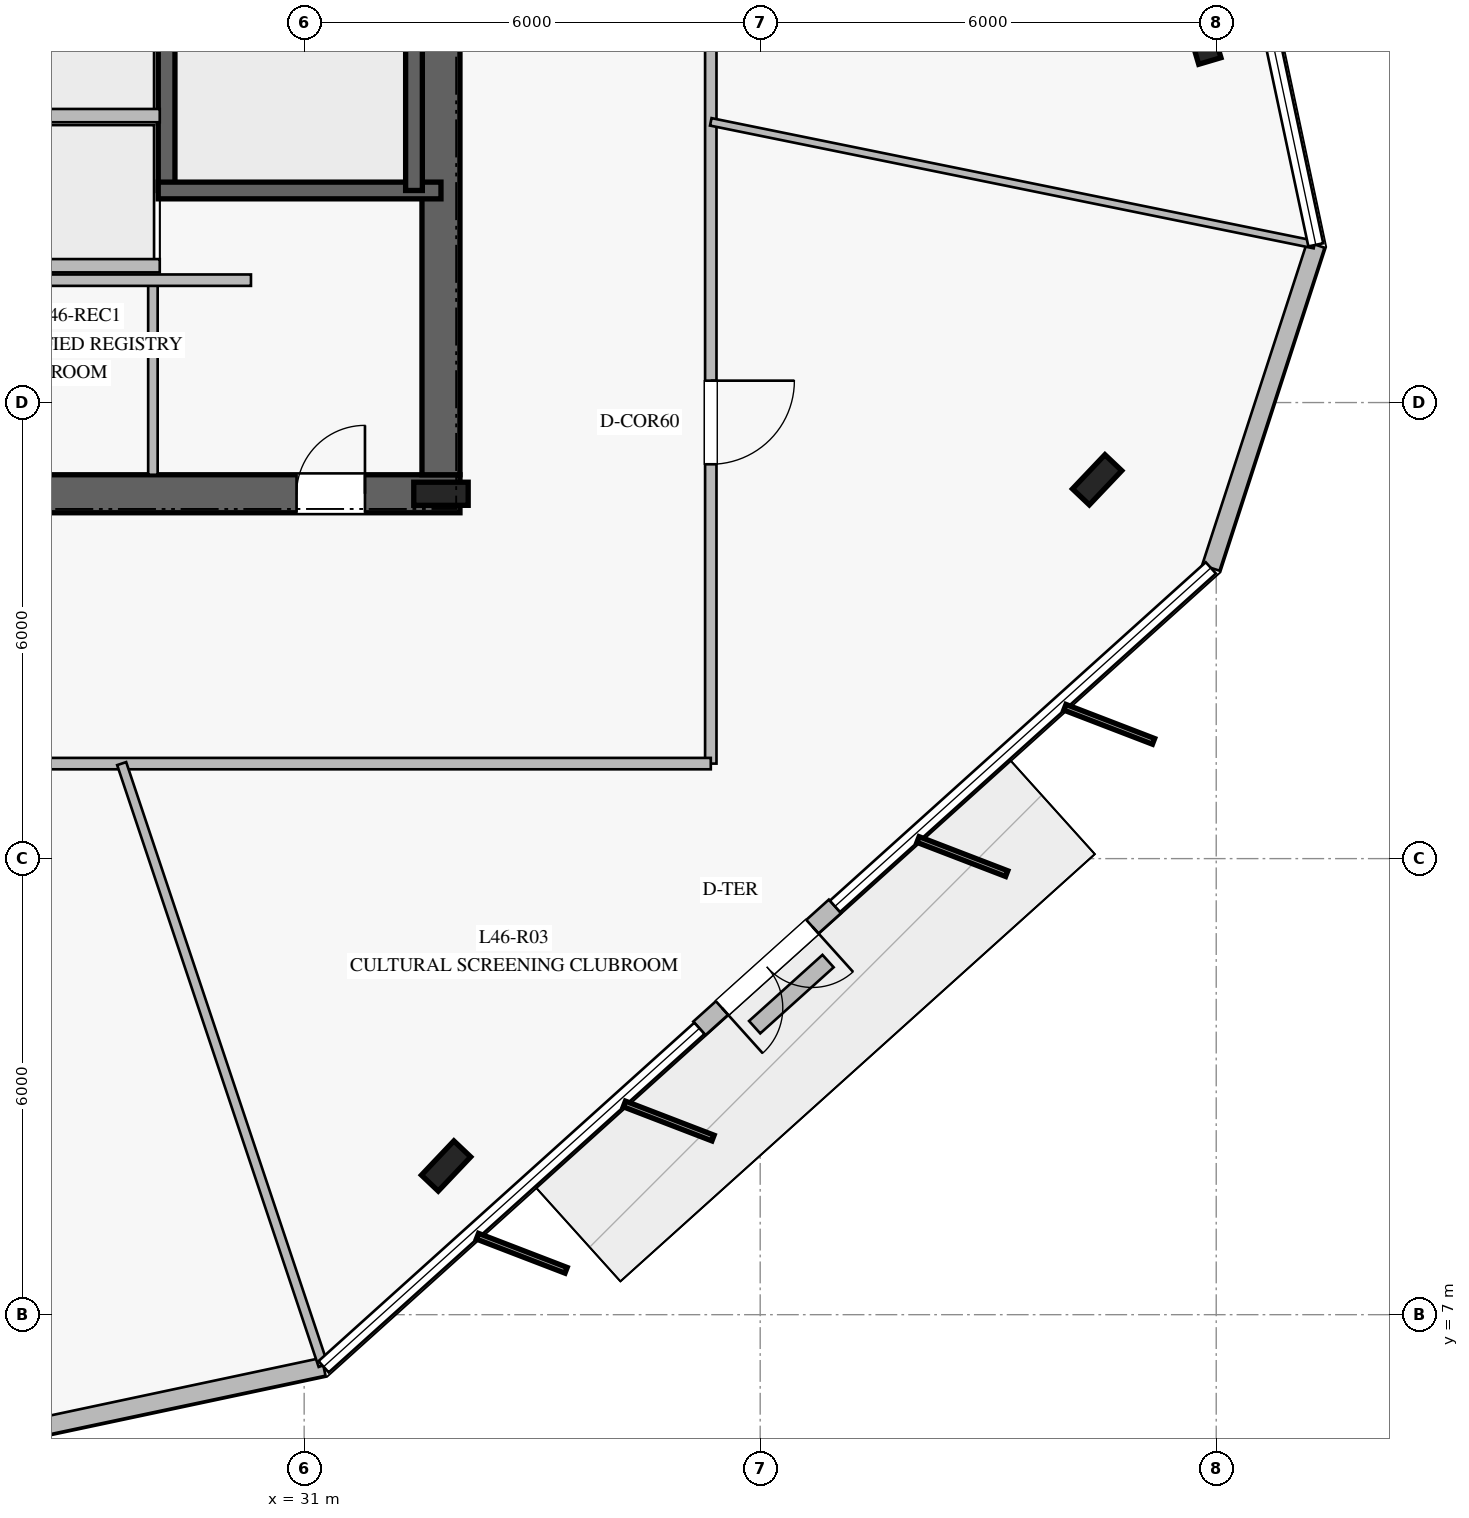
"""IFC4 building model, lengths in metres.
Left out: names, types, materials, properties, quantities, classifications, styles, units other than length and angle.
Written with IfcOpenShell. Run it as: python <this file> out.ifc"""

import sys

from ifc_helpers import new_model, si_unit, direction, frame, frame_2d, origin, origin_2d, place, context, subcontext, project, spatial, rectangle, i_section, extrude, element, fill, save


model = new_model("IFC4")
c1 = context("Model", 3, precision=1e-05, world=origin(), true_north=direction((0.0, 1.0)))
c2 = subcontext(c1, "Body", "Model", "MODEL_VIEW")
j1 = project(units=[si_unit("LENGTHUNIT", "METRE"), si_unit("PLANEANGLEUNIT", "RADIAN")], contexts=[c1])
p1 = place(None, origin())
s1 = spatial("IfcSite", under=j1, at=p1, CompositionType="ELEMENT")
p2 = place(p1, origin())
s2 = spatial("IfcBuilding", under=s1, at=p2, CompositionType="ELEMENT")
p3 = place(p2, frame((0.0, 0.0, 192.8)))
s3 = spatial("IfcBuildingStorey", under=s2, at=p3, CompositionType="ELEMENT", Elevation=192.8)
p4 = place(p3, frame((16.95, 17.8, 0.0), z_axis=(0.0, 0.0, 1.0), x_axis=(1.0, 0.0, 0.0)))
e1 = element("IfcWall", 1, at=p4, inside=s3, PredefinedType="SHEAR", context=c2, shape_type="SweptSolid", body=[
    extrude(rectangle(XDim=16.1, YDim=0.5, at=frame_2d((8.05, 0.0))), origin(), (0.0, 0.0, 1.0), 3.78),
])
p5 = place(p4, frame((5.0, 0.0, 0.0)))
e2 = element("IfcOpeningElement", 2, at=p5, cuts=e1, PredefinedType="OPENING", context=c2, shape_type="SweptSolid", body=[
    extrude(rectangle(XDim=1.2, YDim=2.25, at=frame_2d((0.6, 1.125))), frame((0.0, 0.26, 0.0), z_axis=(0.0, -1.0, 0.0), x_axis=(1.0, 0.0, 0.0)), (0.0, 0.0, 1.0), 0.52),
])
p6 = place(p4, frame((13.95, 0.0, 0.0)))
e3 = element("IfcOpeningElement", 3, at=p6, cuts=e1, PredefinedType="OPENING", context=c2, shape_type="SweptSolid", body=[
    extrude(rectangle(XDim=0.9, YDim=2.1, at=frame_2d((0.45, 1.05))), frame((0.0, 0.26, 0.0), z_axis=(0.0, -1.0, 0.0), x_axis=(1.0, 0.0, 0.0)), (0.0, 0.0, 1.0), 0.52),
])
p7 = place(p4, frame((9.2, 0.0, 0.0)))
e4 = element("IfcOpeningElement", 4, at=p7, cuts=e1, PredefinedType="OPENING", context=c2, shape_type="SweptSolid", body=[
    extrude(rectangle(XDim=1.1, YDim=2.2, at=frame_2d((0.55, 1.1))), frame((0.0, 0.26, 0.0), z_axis=(0.0, -1.0, 0.0), x_axis=(1.0, 0.0, 0.0)), (0.0, 0.0, 1.0), 0.52),
])
p8 = place(p3, frame((32.8, 18.05, 0.0), z_axis=(0.0, 0.0, 1.0), x_axis=(0.0, 1.0, 0.0)))
e5 = element("IfcWall", 5, at=p8, inside=s3, PredefinedType="SHEAR", context=c2, shape_type="SweptSolid", body=[
    extrude(rectangle(XDim=13.9, YDim=0.5, at=frame_2d((6.95, 0.0))), origin(), (0.0, 0.0, 1.0), 3.78),
])
p9 = place(p3, frame((32.8, 17.8, 0.0), z_axis=(0.0, 0.0, 1.0), x_axis=(1.0, 0.0, 0.0)))
e6 = element("IfcColumn", 6, at=p9, inside=s3, PredefinedType="COLUMN", context=c2, shape_type="SweptSolid", body=[
    extrude(i_section(OverallWidth=0.304, OverallDepth=0.716, WebThickness=0.021, FlangeThickness=0.04, at=origin_2d()), origin(), (0.0, 0.0, 1.0), 4.0),
])
p10 = place(p3, frame((29.19, 21.79, 0.0), z_axis=(0.0, 0.0, 1.0), x_axis=(0.0, 1.0, 0.0)))
e7 = element("IfcWall", 7, at=p10, inside=s3, PredefinedType="SOLIDWALL", context=c2, shape_type="SweptSolid", body=[
    extrude(rectangle(XDim=7.22, YDim=0.22, at=frame_2d((3.61, 0.0))), origin(), (0.0, 0.0, 1.0), 3.78),
])
p11 = place(p10, frame((5.88, 0.0, 0.0)))
e8 = element("IfcOpeningElement", 8, at=p11, cuts=e7, PredefinedType="OPENING", context=c2, shape_type="SweptSolid", body=[
    extrude(rectangle(XDim=1.15, YDim=2.2, at=frame_2d((0.575, 1.1))), frame((0.0, 0.12, 0.0), z_axis=(0.0, -1.0, 0.0), x_axis=(1.0, 0.0, 0.0)), (0.0, 0.0, 1.0), 0.24),
])
p12 = place(p3, frame((29.08, 21.79, 0.0), z_axis=(0.0, 0.0, 1.0), x_axis=(1.0, 0.0, 0.0)))
e9 = element("IfcWall", 9, at=p12, inside=s3, PredefinedType="SOLIDWALL", context=c2, shape_type="SweptSolid", body=[
    extrude(rectangle(XDim=3.72, YDim=0.22, at=frame_2d((1.86, 0.0))), origin(), (0.0, 0.0, 1.0), 3.78),
])
p13 = place(p3, frame((32.445, 29.01, 0.0), z_axis=(0.0, 0.0, 1.0), x_axis=(0.0, -1.0, 0.0)))
e10 = element("IfcWall", 10, at=p13, inside=s3, PredefinedType="SOLIDWALL", context=c2, shape_type="SweptSolid", body=[
    extrude(rectangle(XDim=7.22, YDim=0.22, at=frame_2d((3.61, 0.0))), origin(), (0.0, 0.0, 1.0), 3.78),
])
for number, where, z_axis, x_axis in (
    (11, (32.867, 8.956, 0.0), (0.0, 0.0, 1.0), (0.688, 0.725, 0.0)),
    (12, (41.433, 17.984, 0.0), (0.0, 0.0, 1.0), (0.688, 0.725, 0.0)),
    (13, (42.828, 23.791, 0.0), (0.0, 0.0, 1.0), (-0.284, 0.959, 0.0)),
):
    element("IfcColumn", number, at=place(p3, frame(where, z_axis=z_axis, x_axis=x_axis)), inside=s3, PredefinedType="COLUMN", context=c2, shape_type="SweptSolid", body=[
        extrude(i_section(OverallWidth=0.305, OverallDepth=0.62, WebThickness=0.021, FlangeThickness=0.04, at=origin_2d()), origin(), (0.0, 0.0, 1.0), 4.0),
    ])
p14 = place(p3, frame((26.885, 5.386, 0.0), z_axis=(0.0, 0.0, 1.0), x_axis=(0.978154407503, 0.20787966491, 0.0)))
e14 = element("IfcWall", 14, at=p14, inside=s3, PredefinedType="STANDARD", context=c2, shape_type="SweptSolid", body=[
    extrude(rectangle(XDim=4.469, YDim=0.24, at=frame_2d((2.234, 0.0))), origin(), (0.0, 0.0, 1.0), 3.78),
])
p15 = place(p3, frame((36.2, 10.767, 0.0), z_axis=(0.0, 0.0, 1.0), x_axis=(0.743410489012, 0.668835439273, 0.0)))
e15 = element("IfcWall", 15, at=p15, inside=s3, PredefinedType="STANDARD", context=c2, shape_type="SweptSolid", body=[
    extrude(rectangle(XDim=2.4, YDim=0.24, at=frame_2d((1.2, 0.0))), origin(), (0.0, 0.0, 1.0), 3.78),
])
p16 = place(p15, frame((0.4, 0.0, 0.0)))
e16 = element("IfcOpeningElement", 16, at=p16, cuts=e15, PredefinedType="OPENING", context=c2, shape_type="SweptSolid", body=[
    extrude(rectangle(XDim=1.6, YDim=2.25, at=frame_2d((0.8, 1.125))), frame((0.0, 0.13, 0.0), z_axis=(0.0, -1.0, 0.0), x_axis=(1.0, 0.0, 0.0)), (0.0, 0.0, 1.0), 0.26),
])
p17 = place(p3, frame((42.929, 16.825, 0.0), z_axis=(0.0, 0.0, 1.0), x_axis=(0.309056424215, 0.95104370386, 0.0)))
e17 = element("IfcWall", 17, at=p17, inside=s3, PredefinedType="STANDARD", context=c2, shape_type="SweptSolid", body=[
    extrude(rectangle(XDim=4.469, YDim=0.24, at=frame_2d((2.234, 0.0))), origin(), (0.0, 0.0, 1.0), 3.78),
])
p18 = place(p3, frame((36.927, 10.782, 0.0), z_axis=(0.0, 0.0, 1.0), x_axis=(0.743041992212, 0.669244796625, 0.0)))
e18 = element("IfcWall", 18, at=p18, inside=s3, PredefinedType="USERDEFINED", context=c2, shape_type="SweptSolid", body=[
    extrude(rectangle(XDim=1.3, YDim=0.22, at=frame_2d((0.65, 0.0))), origin(), (0.0, 0.0, 1.0), 0.4),
])
p19 = place(p3, frame((29.01, 18.05, 0.0), z_axis=(0.0, 0.0, 1.0), x_axis=(0.0, 1.0, 0.0)))
e19 = element("IfcWall", 19, at=p19, inside=s3, PredefinedType="PARTITIONING", context=c2, shape_type="SweptSolid", body=[
    extrude(rectangle(XDim=2.5, YDim=0.125, at=frame_2d((1.25, 0.0))), origin(), (0.0, 0.0, 1.0), 3.78),
])
p20 = place(p3, frame((24.4, 20.61, 0.0), z_axis=(0.0, 0.0, 1.0), x_axis=(1.0, 0.0, 0.0)))
e20 = element("IfcWall", 20, at=p20, inside=s3, PredefinedType="PARTITIONING", context=c2, shape_type="SweptSolid", body=[
    extrude(rectangle(XDim=5.9, YDim=0.15, at=frame_2d((2.95, 0.0))), origin(), (0.0, 0.0, 1.0), 3.78),
])
for number, where, z_axis, x_axis in (
    (21, (26.75, 20.8, 0.0), (0.0, 0.0, 1.0), (1.0, 0.0, 0.0)),
    (22, (26.75, 22.775, 0.0), (0.0, 0.0, 1.0), (1.0, 0.0, 0.0)),
):
    element("IfcWall", number, at=place(p3, frame(where, z_axis=z_axis, x_axis=x_axis)), inside=s3, PredefinedType="PARTITIONING", context=c2, shape_type="SweptSolid", body=[
        extrude(rectangle(XDim=2.35, YDim=0.175, at=frame_2d((1.175, 0.0))), origin(), (0.0, 0.0, 1.0), 3.78),
    ])
p21 = place(p3, frame((36.35, 35.75, 0.0), z_axis=(0.0, 0.0, 1.0), x_axis=(0.0, -1.0, 0.0)))
e23 = element("IfcWall", 23, at=p21, inside=s3, PredefinedType="PARTITIONING", context=c2, shape_type="SweptSolid", body=[
    extrude(rectangle(XDim=21.5, YDim=0.15, at=frame_2d((10.75, 0.0))), origin(), (0.0, 0.0, 1.0), 3.05),
])
p22 = place(p21, frame((16.462, 0.0, 0.0)))
e24 = element("IfcOpeningElement", 24, at=p22, cuts=e23, PredefinedType="OPENING", context=c2, shape_type="SweptSolid", body=[
    extrude(rectangle(XDim=1.1, YDim=2.2, at=frame_2d((0.55, 1.1))), frame((0.0, 0.085, 0.0), z_axis=(0.0, -1.0, 0.0), x_axis=(1.0, 0.0, 0.0)), (0.0, 0.0, 1.0), 0.17),
])
p23 = place(p21, frame((7.196, 0.0, 0.0)))
e25 = element("IfcOpeningElement", 25, at=p23, cuts=e23, PredefinedType="OPENING", context=c2, shape_type="SweptSolid", body=[
    extrude(rectangle(XDim=1.1, YDim=2.2, at=frame_2d((0.55, 1.1))), frame((0.0, 0.085, 0.0), z_axis=(0.0, -1.0, 0.0), x_axis=(1.0, 0.0, 0.0)), (0.0, 0.0, 1.0), 0.17),
])
p24 = place(p3, frame((36.35, 14.25, 0.0), z_axis=(0.0, 0.0, 1.0), x_axis=(-1.0, 0.0, 0.0)))
e26 = element("IfcWall", 26, at=p24, inside=s3, PredefinedType="PARTITIONING", context=c2, shape_type="SweptSolid", body=[
    extrude(rectangle(XDim=22.7, YDim=0.15, at=frame_2d((11.35, 0.0))), origin(), (0.0, 0.0, 1.0), 3.05),
])
p25 = place(p24, frame((13.784, 0.0, 0.0)))
e27 = element("IfcOpeningElement", 27, at=p25, cuts=e26, PredefinedType="OPENING", context=c2, shape_type="SweptSolid", body=[
    extrude(rectangle(XDim=1.1, YDim=2.2, at=frame_2d((0.55, 1.1))), frame((0.0, 0.085, 0.0), z_axis=(0.0, -1.0, 0.0), x_axis=(1.0, 0.0, 0.0)), (0.0, 0.0, 1.0), 0.17),
])
p26 = place(p3, frame((28.599, 14.25, 0.0), z_axis=(0.0, 0.0, 1.0), x_axis=(0.317473059153, -0.948267291808, 0.0)))
e28 = element("IfcWall", 28, at=p26, inside=s3, PredefinedType="PARTITIONING", context=c2, shape_type="SweptSolid", body=[
    extrude(rectangle(XDim=8.35, YDim=0.125, at=frame_2d((4.175, 0.0))), origin(), (0.0, 0.0, 1.0), 3.18),
])
p27 = place(p3, frame((36.35, 22.693, 0.0), z_axis=(0.0, 0.0, 1.0), x_axis=(0.979938257783, -0.199301306901, 0.0)))
e29 = element("IfcWall", 29, at=p27, inside=s3, PredefinedType="MOVABLE", context=c2, shape_type="SweptSolid", body=[
    extrude(rectangle(XDim=8.104, YDim=0.1, at=frame_2d((4.052, 0.0))), origin(), (0.0, 0.0, 1.0), 3.18),
])
p28 = place(p16, frame((1.6, 0.0, 0.0), z_axis=(0.0, 0.0, 1.0), x_axis=(-1.0, 0.0, 0.0)))
e30 = element("IfcDoor", 30, at=p28, inside=s3, OperationType="DOUBLE_DOOR_SINGLE_SWING", PredefinedType="DOOR", context=c2, shape_type="SweptSolid", body=[
    extrude(rectangle(XDim=1.6, YDim=2.25, at=frame_2d((0.8, 1.125))), frame((0.0, 0.025, 0.0), z_axis=(0.0, -1.0, 0.0), x_axis=(1.0, 0.0, 0.0)), (0.0, 0.0, 1.0), 0.05),
])
fill(e16, e30)
p29 = place(p6, origin())
e31 = element("IfcDoor", 31, at=p29, inside=s3, OperationType="SINGLE_SWING_RIGHT", PredefinedType="DOOR", context=c2, shape_type="SweptSolid", body=[
    extrude(rectangle(XDim=0.9, YDim=2.1, at=frame_2d((0.45, 1.05))), frame((0.0, 0.025, 0.0), z_axis=(0.0, -1.0, 0.0), x_axis=(1.0, 0.0, 0.0)), (0.0, 0.0, 1.0), 0.05),
])
fill(e3, e31)
p30 = place(p22, origin())
e32 = element("IfcDoor", 32, at=p30, inside=s3, OperationType="SINGLE_SWING_LEFT", PredefinedType="DOOR", context=c2, shape_type="SweptSolid", body=[
    extrude(rectangle(XDim=1.1, YDim=2.2, at=frame_2d((0.55, 1.1))), frame((0.0, 0.025, 0.0), z_axis=(0.0, -1.0, 0.0), x_axis=(1.0, 0.0, 0.0)), (0.0, 0.0, 1.0), 0.05),
])
fill(e24, e32)
save(model, sys.argv[1])
